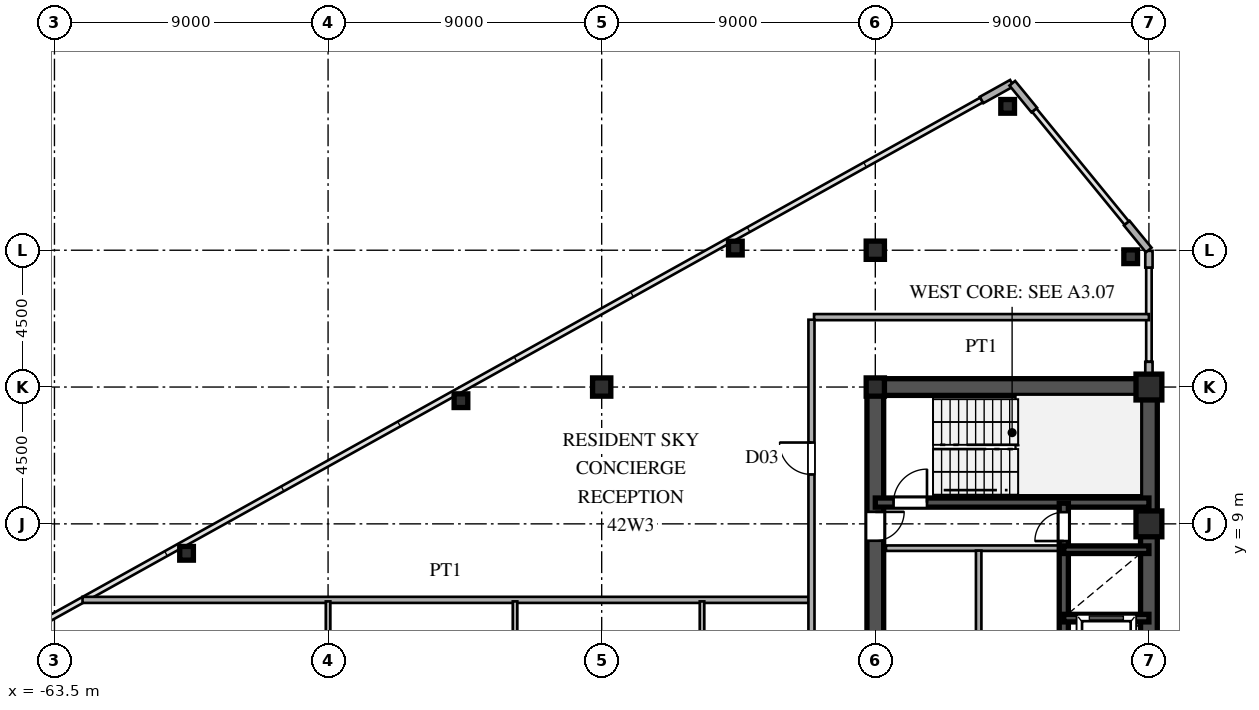
"""IFC4 building model, lengths in metres.
Left out: names, types, materials, properties, quantities, classifications, styles, units other than length and angle.
Written with IfcOpenShell. Run it as: python <this file> out.ifc"""

import sys

from ifc_helpers import new_model, si_unit, direction, frame, frame_2d, origin, origin_2d, place, context, subcontext, project, spatial, rectangle, hollow_rectangle, i_section, extrude, source, transform, mapped, element, fill, save


model = new_model("IFC4")
c1 = context("Model", 3, precision=1e-05, world=origin(), true_north=direction((0.0, 1.0)))
c2 = subcontext(c1, "Body", "Model", "MODEL_VIEW")
j1 = project(units=[si_unit("LENGTHUNIT", "METRE"), si_unit("PLANEANGLEUNIT", "RADIAN")], contexts=[c1])
p1 = place(None, origin())
s1 = spatial("IfcSite", under=j1, at=p1, CompositionType="ELEMENT")
p2 = place(p1, origin())
s2 = spatial("IfcBuilding", under=s1, at=p2, CompositionType="ELEMENT")
p3 = place(p2, frame((0.0, 0.0, 158.4)))
s3 = spatial("IfcBuildingStorey", under=s2, at=p3, CompositionType="ELEMENT", Elevation=158.4)
m1 = source(origin(), c2, "Body", "SweptSolid", [
    extrude(hollow_rectangle(XDim=0.85, YDim=0.85, WallThickness=0.036, at=origin_2d()), origin(), (0.0, 0.0, 1.0), 3.6),
])
for number, where, z_axis, x_axis in (
    (1, (-27.5, 9.0, 0.0), (0.0, 0.0, 1.0), (1.0, 0.0, 0.0)),
    (2, (-27.5, 13.5, 0.0), (0.0, 0.0, 1.0), (1.0, 0.0, 0.0)),
):
    element("IfcColumn", number, at=place(p3, frame(where, z_axis=z_axis, x_axis=x_axis)), inside=s3, PredefinedType="COLUMN", context=c2, shape_type="MappedRepresentation", body=[
        mapped(m1, transform((0.0, 0.0, 0.0), scale=1.0)),
    ])
m2 = source(origin(), c2, "Body", "SweptSolid", [
    extrude(i_section(OverallWidth=0.6, OverallDepth=0.6, WebThickness=0.025, FlangeThickness=0.04, at=origin_2d()), origin(), (0.0, 0.0, 1.0), 3.6),
])
for number, where, z_axis, x_axis in (
    (3, (-36.5, 13.5, 0.0), (0.0, 0.0, 1.0), (1.0, 0.0, 0.0)),
    (4, (-36.5, 18.0, 0.0), (0.0, 0.0, 1.0), (1.0, 0.0, 0.0)),
    (5, (-45.5, 13.5, 0.0), (0.0, 0.0, 1.0), (1.0, 0.0, 0.0)),
):
    element("IfcColumn", number, at=place(p3, frame(where, z_axis=z_axis, x_axis=x_axis)), inside=s3, PredefinedType="COLUMN", context=c2, shape_type="MappedRepresentation", body=[
        mapped(m2, transform((0.0, 0.0, 0.0), scale=1.0)),
    ])
m3 = source(origin(), c2, "Body", "SweptSolid", [
    extrude(hollow_rectangle(XDim=0.45, YDim=0.45, WallThickness=0.018, at=origin_2d()), origin(), (0.0, 0.0, 1.0), 3.6),
])
for number, where, z_axis, x_axis in (
    (6, (-28.1, 17.786, 0.0), (0.0, 0.0, 1.0), (1.0, 0.0, 0.0)),
    (7, (-32.147, 22.732, 0.0), (0.0, 0.0, 1.0), (1.0, 0.0, 0.0)),
    (8, (-41.104, 18.071, 0.0), (0.0, 0.0, 1.0), (1.0, 0.0, 0.0)),
    (9, (-50.129, 13.051, 0.0), (0.0, 0.0, 1.0), (1.0, 0.0, 0.0)),
    (10, (-59.155, 8.031, 0.0), (0.0, 0.0, 1.0), (1.0, 0.0, 0.0)),
):
    element("IfcColumn", number, at=place(p3, frame(where, z_axis=z_axis, x_axis=x_axis)), inside=s3, PredefinedType="COLUMN", context=c2, shape_type="MappedRepresentation", body=[
        mapped(m3, transform((0.0, 0.0, 0.0), scale=1.0)),
    ])
p4 = place(p3, frame((-27.5, 13.78, 0.0), z_axis=(0.0, 0.0, 1.0), x_axis=(0.0, 1.0, 0.0)))
e11 = element("IfcWall", 11, at=p4, inside=s3, PredefinedType="SOLIDWALL", context=c2, shape_type="SweptSolid", body=[
    extrude(rectangle(XDim=0.55, YDim=0.24, at=frame_2d((0.275, 0.0))), origin(), (0.0, 0.0, 1.0), 2.84),
])
p5 = place(p3, frame((-27.5, 17.43, 0.0), z_axis=(0.0, 0.0, 1.0), x_axis=(0.0, 1.0, 0.0)))
e12 = element("IfcWall", 12, at=p5, inside=s3, PredefinedType="SOLIDWALL", context=c2, shape_type="SweptSolid", body=[
    extrude(rectangle(XDim=0.55, YDim=0.24, at=frame_2d((0.275, 0.0))), origin(), (0.0, 0.0, 1.0), 3.34),
])
for number, where, z_axis, x_axis in (
    (13, (-27.506, 18.008, 0.0), (0.0, 0.0, 1.0), (-0.633, 0.774, 0.0)),
    (14, (-31.272, 22.61, 0.0), (0.0, 0.0, 1.0), (-0.633, 0.774, 0.0)),
):
    element("IfcWall", number, at=place(p3, frame(where, z_axis=z_axis, x_axis=x_axis)), inside=s3, PredefinedType="SOLIDWALL", context=c2, shape_type="SweptSolid", body=[
        extrude(rectangle(XDim=1.14, YDim=0.24, at=frame_2d((0.57, 0.0))), origin(), (0.0, 0.0, 1.0), 3.34),
    ])
p6 = place(p3, frame((-32.009, 23.495, 0.0), z_axis=(0.0, 0.0, 1.0), x_axis=(-0.87385402111, -0.486188389196, 0.0)))
e15 = element("IfcWall", 15, at=p6, inside=s3, PredefinedType="SOLIDWALL", context=c2, shape_type="SweptSolid", body=[
    extrude(rectangle(XDim=1.14, YDim=0.24, at=frame_2d((0.57, 0.0))), origin(), (0.0, 0.0, 1.0), 3.34),
])
p7 = place(p3, frame((-27.5, 1.3, 0.0), z_axis=(0.0, 0.0, 1.0), x_axis=(0.0, 1.0, 0.0)))
e16 = element("IfcWall", 16, at=p7, inside=s3, PredefinedType="SHEAR", context=c2, shape_type="SweptSolid", body=[
    extrude(rectangle(XDim=12.2, YDim=0.55, at=frame_2d((6.1, 0.0))), origin(), (0.0, 0.0, 1.0), 3.34),
])
p8 = place(p3, frame((-36.5, 13.5, 0.0), z_axis=(0.0, 0.0, 1.0), x_axis=(1.0, 0.0, 0.0)))
e17 = element("IfcWall", 17, at=p8, inside=s3, PredefinedType="SHEAR", context=c2, shape_type="SweptSolid", body=[
    extrude(rectangle(XDim=9.0, YDim=0.55, at=frame_2d((4.5, 0.0))), origin(), (0.0, 0.0, 1.0), 3.34),
])
p9 = place(p3, frame((-36.5, 8.2, 0.0), z_axis=(0.0, 0.0, 1.0), x_axis=(0.0, 1.0, 0.0)))
e18 = element("IfcWall", 18, at=p9, inside=s3, PredefinedType="SHEAR", context=c2, shape_type="SweptSolid", body=[
    extrude(rectangle(XDim=5.45, YDim=0.55, at=frame_2d((2.725, 0.0))), origin(), (0.0, 0.0, 1.0), 3.34),
])
p10 = place(p9, frame((0.245, 0.0, 0.0)))
e19 = element("IfcOpeningElement", 19, at=p10, cuts=e18, PredefinedType="OPENING", context=c2, shape_type="SweptSolid", body=[
    extrude(rectangle(XDim=0.95, YDim=2.15, at=frame_2d((0.475, 1.075))), frame((0.0, 0.285, 0.0), z_axis=(0.0, -1.0, 0.0), x_axis=(1.0, 0.0, 0.0)), (0.0, 0.0, 1.0), 0.57),
])
p11 = place(p3, frame((-36.5, 1.3, 0.0), z_axis=(0.0, 0.0, 1.0), x_axis=(0.0, 1.0, 0.0)))
e20 = element("IfcWall", 20, at=p11, inside=s3, PredefinedType="SHEAR", context=c2, shape_type="SweptSolid", body=[
    extrude(rectangle(XDim=6.9, YDim=0.55, at=frame_2d((3.45, 0.0))), origin(), (0.0, 0.0, 1.0), 3.34),
])
p12 = place(p11, frame((2.975, 0.0, 0.0)))
e21 = element("IfcOpeningElement", 21, at=p12, cuts=e20, PredefinedType="OPENING", context=c2, shape_type="SweptSolid", body=[
    extrude(rectangle(XDim=0.95, YDim=2.15, at=frame_2d((0.475, 1.075))), frame((0.0, 0.285, 0.0), z_axis=(0.0, -1.0, 0.0), x_axis=(1.0, 0.0, 0.0)), (0.0, 0.0, 1.0), 0.57),
])
p13 = place(p3, frame((-36.5, 9.7, 0.0), z_axis=(0.0, 0.0, 1.0), x_axis=(1.0, 0.0, 0.0)))
e22 = element("IfcWall", 22, at=p13, inside=s3, PredefinedType="SHEAR", context=c2, shape_type="SweptSolid", body=[
    extrude(rectangle(XDim=9.0, YDim=0.3, at=frame_2d((4.5, 0.0))), origin(), (0.0, 0.0, 1.0), 3.34),
])
p14 = place(p13, frame((0.6, 0.0, 0.0)))
e23 = element("IfcOpeningElement", 23, at=p14, cuts=e22, PredefinedType="OPENING", context=c2, shape_type="SweptSolid", body=[
    extrude(rectangle(XDim=1.1, YDim=2.2, at=frame_2d((0.55, 1.1))), frame((0.0, 0.16, 0.0), z_axis=(0.0, -1.0, 0.0), x_axis=(1.0, 0.0, 0.0)), (0.0, 0.0, 1.0), 0.32),
])
for number, where, z_axis, x_axis in (
    (24, (-30.3, 5.9, 0.0), (0.0, 0.0, 1.0), (1.0, 0.0, 0.0)),
    (25, (-30.3, 8.15, 0.0), (0.0, 0.0, 1.0), (1.0, 0.0, 0.0)),
):
    element("IfcWall", number, at=place(p3, frame(where, z_axis=z_axis, x_axis=x_axis)), inside=s3, PredefinedType="SHEAR", context=c2, shape_type="SweptSolid", body=[
        extrude(rectangle(XDim=2.8, YDim=0.25, at=frame_2d((1.4, 0.0))), origin(), (0.0, 0.0, 1.0), 3.34),
    ])
p15 = place(p3, frame((-30.3, 3.6, 0.0), z_axis=(0.0, 0.0, 1.0), x_axis=(0.0, 1.0, 0.0)))
e26 = element("IfcWall", 26, at=p15, inside=s3, PredefinedType="SHEAR", context=c2, shape_type="SweptSolid", body=[
    extrude(rectangle(XDim=2.3, YDim=0.3, at=frame_2d((1.15, 0.0))), origin(), (0.0, 0.0, 1.0), 3.34),
])
p16 = place(p15, frame((0.6, 0.0, 0.0)))
e27 = element("IfcOpeningElement", 27, at=p16, cuts=e26, PredefinedType="OPENING", context=c2, shape_type="SweptSolid", body=[
    extrude(rectangle(XDim=1.1, YDim=2.2, at=frame_2d((0.55, 1.1))), frame((0.0, 0.16, 0.0), z_axis=(0.0, -1.0, 0.0), x_axis=(1.0, 0.0, 0.0)), (0.0, 0.0, 1.0), 0.32),
])
p17 = place(p3, frame((-30.3, 5.9, 0.0), z_axis=(0.0, 0.0, 1.0), x_axis=(0.0, 1.0, 0.0)))
e28 = element("IfcWall", 28, at=p17, inside=s3, PredefinedType="SHEAR", context=c2, shape_type="SweptSolid", body=[
    extrude(rectangle(XDim=2.25, YDim=0.3, at=frame_2d((1.125, 0.0))), origin(), (0.0, 0.0, 1.0), 3.34),
])
p18 = place(p3, frame((-30.3, 8.15, 0.0), z_axis=(0.0, 0.0, 1.0), x_axis=(0.0, 1.0, 0.0)))
e29 = element("IfcWall", 29, at=p18, inside=s3, PredefinedType="SHEAR", context=c2, shape_type="SweptSolid", body=[
    extrude(rectangle(XDim=1.53, YDim=0.3, at=frame_2d((0.765, 0.0))), origin(), (0.0, 0.0, 1.0), 3.34),
])
p19 = place(p18, frame((0.285, 0.0, 0.0)))
e30 = element("IfcOpeningElement", 30, at=p19, cuts=e29, PredefinedType="OPENING", context=c2, shape_type="SweptSolid", body=[
    extrude(rectangle(XDim=0.95, YDim=2.15, at=frame_2d((0.475, 1.075))), frame((0.0, 0.16, 0.0), z_axis=(0.0, -1.0, 0.0), x_axis=(1.0, 0.0, 0.0)), (0.0, 0.0, 1.0), 0.32),
])
p20 = place(p3, frame((-36.15, 8.2, 0.0), z_axis=(0.0, 0.0, 1.0), x_axis=(1.0, 0.0, 0.0)))
e31 = element("IfcWall", 31, at=p20, inside=s3, PredefinedType="PARTITIONING", context=c2, shape_type="SweptSolid", body=[
    extrude(rectangle(XDim=5.7, YDim=0.18, at=frame_2d((2.85, 0.0))), origin(), (0.0, 0.0, 1.0), 3.34),
])
p21 = place(p3, frame((-33.1, 1.38, 0.0), z_axis=(0.0, 0.0, 1.0), x_axis=(0.0, 1.0, 0.0)))
e32 = element("IfcWall", 32, at=p21, inside=s3, PredefinedType="PARTITIONING", context=c2, shape_type="SweptSolid", body=[
    extrude(rectangle(XDim=6.74, YDim=0.18, at=frame_2d((3.37, 0.0))), origin(), (0.0, 0.0, 1.0), 3.34),
])
p22 = place(p3, frame((-62.577, 6.5, 0.0), z_axis=(0.0, 0.0, 1.0), x_axis=(1.0, 0.0, 0.0)))
e33 = element("IfcWall", 33, at=p22, inside=s3, PredefinedType="PARTITIONING", context=c2, shape_type="SweptSolid", body=[
    extrude(rectangle(XDim=23.897, YDim=0.2, at=frame_2d((11.948, 0.0))), origin(), (0.0, 0.0, 1.0), 3.34),
])
p23 = place(p3, frame((-38.515, 15.8, 0.0), z_axis=(0.0, 0.0, 1.0), x_axis=(1.0, 0.0, 0.0)))
e34 = element("IfcWall", 34, at=p23, inside=s3, PredefinedType="PARTITIONING", context=c2, shape_type="SweptSolid", body=[
    extrude(rectangle(XDim=11.015, YDim=0.2, at=frame_2d((5.507, 0.0))), origin(), (0.0, 0.0, 1.0), 3.34),
])
p24 = place(p3, frame((-54.5, 4.52, 0.0), z_axis=(0.0, 0.0, 1.0), x_axis=(0.0, 1.0, 0.0)))
e35 = element("IfcWall", 35, at=p24, inside=s3, PredefinedType="PARTITIONING", context=c2, shape_type="SweptSolid", body=[
    extrude(rectangle(XDim=1.93, YDim=0.15, at=frame_2d((0.965, 0.0))), origin(), (0.0, 0.0, 1.0), 3.34),
])
p25 = place(p3, frame((-48.35, -7.45, 0.0), z_axis=(0.0, 0.0, 1.0), x_axis=(0.0, 1.0, 0.0)))
e36 = element("IfcWall", 36, at=p25, inside=s3, PredefinedType="PARTITIONING", context=c2, shape_type="SweptSolid", body=[
    extrude(rectangle(XDim=13.9, YDim=0.15, at=frame_2d((6.95, 0.0))), origin(), (0.0, 0.0, 1.0), 3.34),
])
p26 = place(p25, frame((6.475, 0.0, 0.0)))
e37 = element("IfcOpeningElement", 37, at=p26, cuts=e36, PredefinedType="OPENING", context=c2, shape_type="SweptSolid", body=[
    extrude(rectangle(XDim=0.95, YDim=2.15, at=frame_2d((0.475, 1.075))), frame((0.0, 0.085, 0.0), z_axis=(0.0, -1.0, 0.0), x_axis=(1.0, 0.0, 0.0)), (0.0, 0.0, 1.0), 0.17),
])
p27 = place(p25, frame((1.808, 0.0, 0.0)))
e38 = element("IfcOpeningElement", 38, at=p27, cuts=e36, PredefinedType="OPENING", context=c2, shape_type="SweptSolid", body=[
    extrude(rectangle(XDim=0.95, YDim=2.15, at=frame_2d((0.475, 1.075))), frame((0.0, 0.085, 0.0), z_axis=(0.0, -1.0, 0.0), x_axis=(1.0, 0.0, 0.0)), (0.0, 0.0, 1.0), 0.17),
])
p28 = place(p3, frame((-42.2, 2.352, 0.0), z_axis=(0.0, 0.0, 1.0), x_axis=(0.0, 1.0, 0.0)))
e39 = element("IfcWall", 39, at=p28, inside=s3, PredefinedType="PARTITIONING", context=c2, shape_type="SweptSolid", body=[
    extrude(rectangle(XDim=4.098, YDim=0.15, at=frame_2d((2.049, 0.0))), origin(), (0.0, 0.0, 1.0), 3.34),
])
p29 = place(p3, frame((-38.6, -15.715, 0.0), z_axis=(0.0, 0.0, 1.0), x_axis=(0.0, 1.0, 0.0)))
e40 = element("IfcWall", 40, at=p29, inside=s3, PredefinedType="PARTITIONING", context=c2, shape_type="SweptSolid", body=[
    extrude(rectangle(XDim=31.43, YDim=0.2, at=frame_2d((15.715, 0.0))), origin(), (0.0, 0.0, 1.0), 3.34),
])
p30 = place(p29, frame((6.292, 0.0, 0.0)))
e41 = element("IfcOpeningElement", 41, at=p30, cuts=e40, PredefinedType="OPENING", context=c2, shape_type="SweptSolid", body=[
    extrude(rectangle(XDim=1.05, YDim=2.25, at=frame_2d((0.525, 1.125))), frame((0.0, 0.11, 0.0), z_axis=(0.0, -1.0, 0.0), x_axis=(1.0, 0.0, 0.0)), (0.0, 0.0, 1.0), 0.22),
])
p31 = place(p29, frame((14.48, 0.0, 0.0)))
e42 = element("IfcOpeningElement", 42, at=p31, cuts=e40, PredefinedType="OPENING", context=c2, shape_type="SweptSolid", body=[
    extrude(rectangle(XDim=1.05, YDim=2.25, at=frame_2d((0.525, 1.125))), frame((0.0, 0.11, 0.0), z_axis=(0.0, -1.0, 0.0), x_axis=(1.0, 0.0, 0.0)), (0.0, 0.0, 1.0), 0.22),
])
p32 = place(p29, frame((26.34, 0.0, 0.0)))
e43 = element("IfcOpeningElement", 43, at=p32, cuts=e40, PredefinedType="OPENING", context=c2, shape_type="SweptSolid", body=[
    extrude(rectangle(XDim=1.05, YDim=2.25, at=frame_2d((0.525, 1.125))), frame((0.0, 0.11, 0.0), z_axis=(0.0, -1.0, 0.0), x_axis=(1.0, 0.0, 0.0)), (0.0, 0.0, 1.0), 0.22),
])
m4 = source(origin(), c2, "Body", "SweptSolid", [
    extrude(rectangle(XDim=0.95, YDim=2.15, at=frame_2d((0.475, 1.075))), frame((0.0, 0.025, 0.0), z_axis=(0.0, -1.0, 0.0), x_axis=(1.0, 0.0, 0.0)), (0.0, 0.0, 1.0), 0.05),
])
p33 = place(p10, frame((0.95, 0.0, 0.0), z_axis=(0.0, 0.0, 1.0), x_axis=(-1.0, 0.0, 0.0)))
e44 = element("IfcDoor", 44, at=p33, inside=s3, OperationType="SINGLE_SWING_RIGHT", PredefinedType="DOOR", context=c2, shape_type="MappedRepresentation", body=[
    mapped(m4, transform((0.0, 0.0, 0.0), scale=1.0)),
])
fill(e19, e44)
m5 = source(origin(), c2, "Body", "SweptSolid", [
    extrude(rectangle(XDim=1.1, YDim=2.2, at=frame_2d((0.55, 1.1))), frame((0.0, 0.025, 0.0), z_axis=(0.0, -1.0, 0.0), x_axis=(1.0, 0.0, 0.0)), (0.0, 0.0, 1.0), 0.05),
])
p34 = place(p14, origin())
e45 = element("IfcDoor", 45, at=p34, inside=s3, OperationType="SINGLE_SWING_RIGHT", PredefinedType="DOOR", context=c2, shape_type="MappedRepresentation", body=[
    mapped(m5, transform((0.0, 0.0, 0.0), scale=1.0)),
])
fill(e23, e45)
p35 = place(p19, origin())
e46 = element("IfcDoor", 46, at=p35, inside=s3, OperationType="SINGLE_SWING_LEFT", PredefinedType="DOOR", context=c2, shape_type="MappedRepresentation", body=[
    mapped(m4, transform((0.0, 0.0, 0.0), scale=1.0)),
])
fill(e30, e46)
m6 = source(origin(), c2, "Body", "SweptSolid", [
    extrude(rectangle(XDim=1.05, YDim=2.25, at=frame_2d((0.525, 1.125))), frame((0.0, 0.025, 0.0), z_axis=(0.0, -1.0, 0.0), x_axis=(1.0, 0.0, 0.0)), (0.0, 0.0, 1.0), 0.05),
])
p36 = place(p32, origin())
e47 = element("IfcDoor", 47, at=p36, inside=s3, OperationType="SINGLE_SWING_RIGHT", PredefinedType="DOOR", context=c2, shape_type="MappedRepresentation", body=[
    mapped(m6, transform((0.0, 0.0, 0.0), scale=1.0)),
])
fill(e43, e47)
save(model, sys.argv[1])
